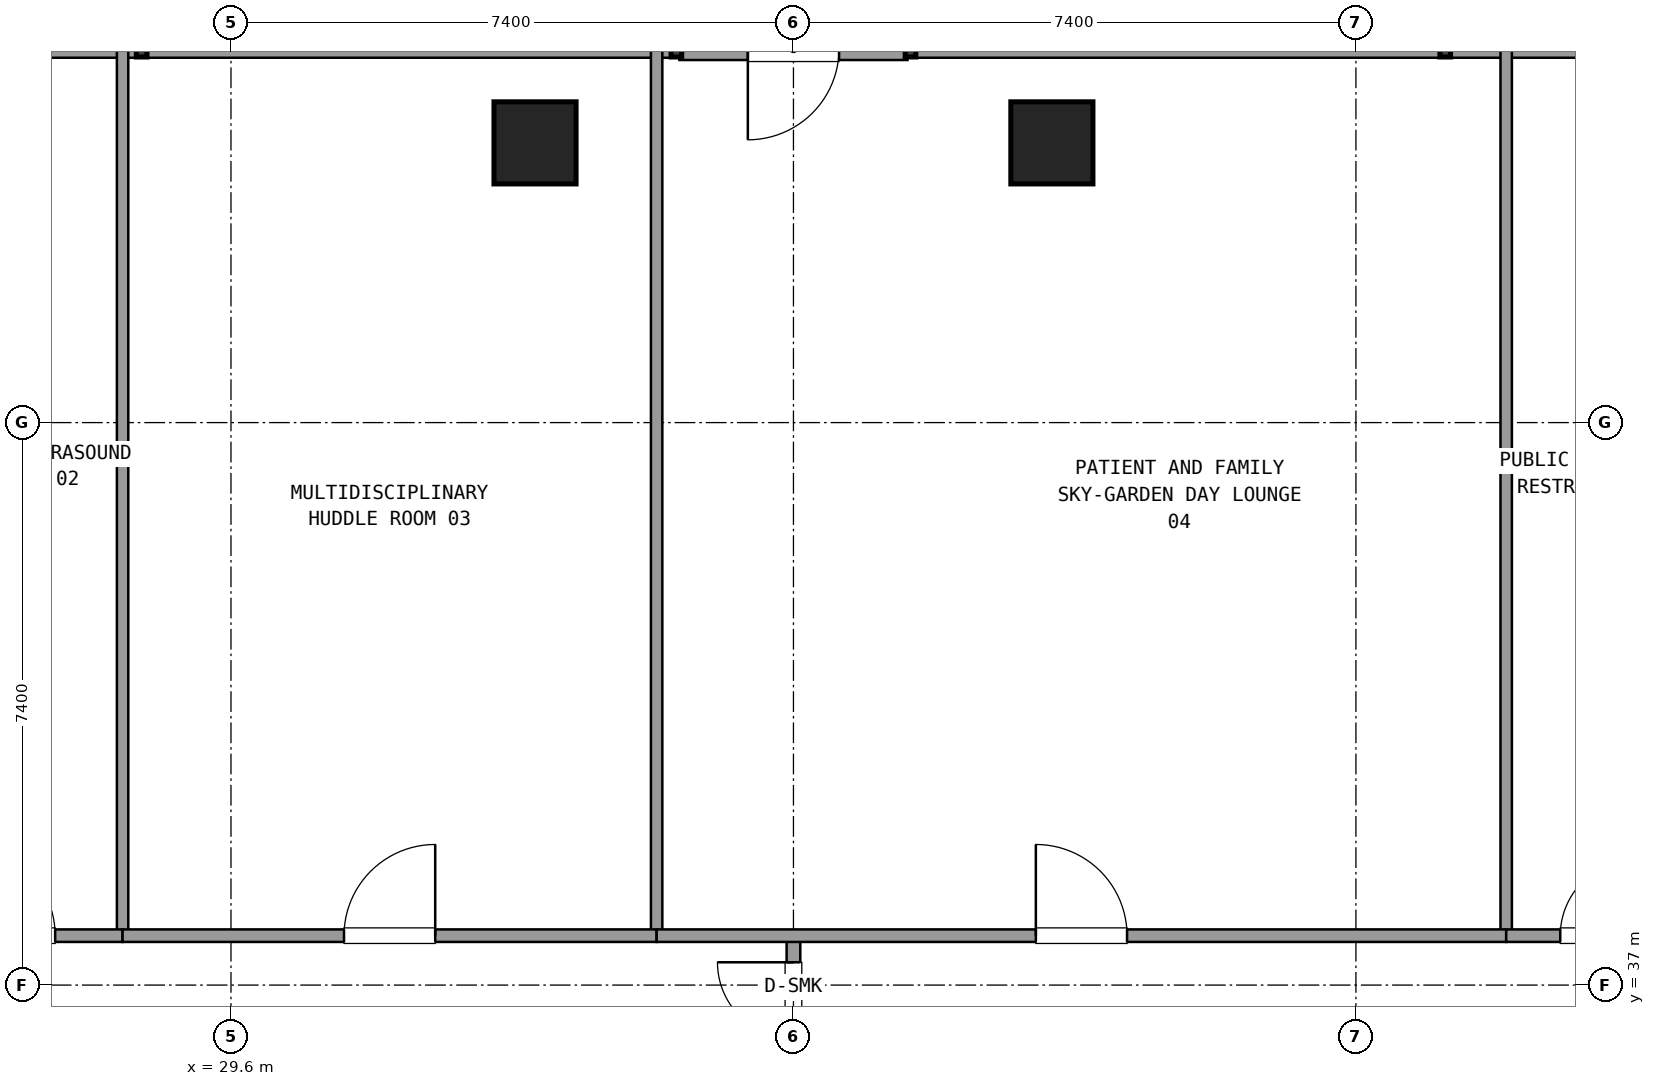
"""IFC4 building model, lengths in metres.
Left out: names, types, materials, properties, quantities, classifications, styles, units other than length and angle.
Written with IfcOpenShell. Run it as: python <this file> out.ifc"""

import sys

from ifc_helpers import new_model, si_unit, direction, frame, frame_2d, origin, origin_2d, place, context, subcontext, project, spatial, rectangle, extrude, element, fill, save


model = new_model("IFC4")
c1 = context("Model", 3, precision=1e-05, world=origin(), true_north=direction((0.0, 1.0)))
c2 = subcontext(c1, "Body", "Model", "MODEL_VIEW")
j1 = project(units=[si_unit("LENGTHUNIT", "METRE"), si_unit("PLANEANGLEUNIT", "RADIAN")], contexts=[c1])
p1 = place(None, origin())
s1 = spatial("IfcSite", under=j1, at=p1, CompositionType="ELEMENT")
p2 = place(p1, origin())
s2 = spatial("IfcBuilding", under=s1, at=p2, CompositionType="ELEMENT")
p3 = place(p2, frame((0.0, 0.0, 38.34)))
s3 = spatial("IfcBuildingStorey", under=s2, at=p3, CompositionType="ELEMENT", Elevation=38.34)
for number, where, z_axis, x_axis in (
    (1, (40.4, 48.08, 0.0), (0.0, 0.0, 1.0), (1.0, 0.0, 0.0)),
    (2, (33.6, 48.08, 0.0), (0.0, 0.0, 1.0), (1.0, 0.0, 0.0)),
):
    element("IfcColumn", number, at=place(p3, frame(where, z_axis=z_axis, x_axis=x_axis)), inside=s3, PredefinedType="COLUMN", context=c2, shape_type="SweptSolid", body=[
        extrude(rectangle(XDim=1.08, YDim=1.08, at=origin_2d()), origin(), (0.0, 0.0, 1.0), 3.6),
    ])
p4 = place(p3, frame((38.5, 49.32, 0.0), z_axis=(0.0, 0.0, 1.0), x_axis=(-1.0, 0.0, 0.0)))
e3 = element("IfcWall", 3, at=p4, inside=s3, PredefinedType="SOLIDWALL", context=c2, shape_type="SweptSolid", body=[
    extrude(rectangle(XDim=3.0, YDim=0.3, at=frame_2d((1.5, 0.0))), origin(), (0.0, 0.0, 1.0), 2.65),
])
p5 = place(p4, frame((0.9, 0.0, 0.0)))
e4 = element("IfcOpeningElement", 4, at=p5, cuts=e3, PredefinedType="OPENING", context=c2, shape_type="SweptSolid", body=[
    extrude(rectangle(XDim=1.2, YDim=2.2, at=frame_2d((0.6, 1.1))), frame((0.0, 0.16, 0.0), z_axis=(0.0, -1.0, 0.0), x_axis=(1.0, 0.0, 0.0)), (0.0, 0.0, 1.0), 0.32),
])
for number, where, z_axis, x_axis in (
    (5, (59.645, 49.32, 0.0), (0.0, 0.0, 1.0), (-1.0, 0.0, 0.0)),
    (6, (35.46, 49.32, 0.0), (0.0, 0.0, 1.0), (-1.0, 0.0, 0.0)),
):
    element("IfcWall", number, at=place(p3, frame(where, z_axis=z_axis, x_axis=x_axis)), inside=s3, PredefinedType="SOLIDWALL", context=c2, shape_type="SweptSolid", body=[
        extrude(rectangle(XDim=21.105, YDim=0.24, at=frame_2d((10.552, 0.0))), origin(), (0.0, 0.0, 1.0), 0.85),
    ])
p6 = place(p3, frame((37.0, 34.95, 0.0), z_axis=(0.0, 0.0, 1.0), x_axis=(0.0, 1.0, 0.0)))
e7 = element("IfcWall", 7, at=p6, inside=s3, PredefinedType="PARTITIONING", context=c2, shape_type="SweptSolid", body=[
    extrude(rectangle(XDim=2.7, YDim=0.18, at=frame_2d((1.35, 0.0))), origin(), (0.0, 0.0, 1.0), 2.61),
])
p7 = place(p6, frame((0.35, 0.0, 0.0)))
e8 = element("IfcOpeningElement", 8, at=p7, cuts=e7, PredefinedType="OPENING", context=c2, shape_type="SweptSolid", body=[
    extrude(rectangle(XDim=2.0, YDim=2.2, at=frame_2d((1.0, 1.1))), frame((0.0, 0.1, 0.0), z_axis=(0.0, -1.0, 0.0), x_axis=(1.0, 0.0, 0.0)), (0.0, 0.0, 1.0), 0.2),
])
p8 = place(p3, frame((28.174, 37.65, 0.0), z_axis=(0.0, 0.0, 1.0), x_axis=(0.0, 1.0, 0.0)))
e9 = element("IfcWall", 9, at=p8, inside=s3, PredefinedType="PARTITIONING", context=c2, shape_type="SweptSolid", body=[
    extrude(rectangle(XDim=11.65, YDim=0.15, at=frame_2d((5.825, 0.0))), origin(), (0.0, 0.0, 1.0), 2.61),
])
p9 = place(p3, frame((25.2, 37.65, 0.0), z_axis=(0.0, 0.0, 1.0), x_axis=(1.0, 0.0, 0.0)))
e10 = element("IfcWall", 10, at=p9, inside=s3, PredefinedType="PARTITIONING", context=c2, shape_type="SweptSolid", body=[
    extrude(rectangle(XDim=2.974, YDim=0.165, at=frame_2d((1.487, 0.0))), origin(), (0.0, 0.0, 1.0), 2.61),
])
p10 = place(p9, frame((0.887, 0.0, 0.0)))
e11 = element("IfcOpeningElement", 11, at=p10, cuts=e10, PredefinedType="OPENING", context=c2, shape_type="SweptSolid", body=[
    extrude(rectangle(XDim=1.2, YDim=2.15, at=frame_2d((0.6, 1.075))), frame((0.0, 0.093, 0.0), z_axis=(0.0, -1.0, 0.0), x_axis=(1.0, 0.0, 0.0)), (0.0, 0.0, 1.0), 0.185),
])
p11 = place(p3, frame((35.2, 37.65, 0.0), z_axis=(0.0, 0.0, 1.0), x_axis=(0.0, 1.0, 0.0)))
e12 = element("IfcWall", 12, at=p11, inside=s3, PredefinedType="PARTITIONING", context=c2, shape_type="SweptSolid", body=[
    extrude(rectangle(XDim=11.65, YDim=0.15, at=frame_2d((5.825, 0.0))), origin(), (0.0, 0.0, 1.0), 2.61),
])
p12 = place(p3, frame((28.174, 37.65, 0.0), z_axis=(0.0, 0.0, 1.0), x_axis=(1.0, 0.0, 0.0)))
e13 = element("IfcWall", 13, at=p12, inside=s3, PredefinedType="PARTITIONING", context=c2, shape_type="SweptSolid", body=[
    extrude(rectangle(XDim=7.026, YDim=0.165, at=frame_2d((3.513, 0.0))), origin(), (0.0, 0.0, 1.0), 2.61),
])
p13 = place(p12, frame((2.913, 0.0, 0.0)))
e14 = element("IfcOpeningElement", 14, at=p13, cuts=e13, PredefinedType="OPENING", context=c2, shape_type="SweptSolid", body=[
    extrude(rectangle(XDim=1.2, YDim=2.15, at=frame_2d((0.6, 1.075))), frame((0.0, 0.093, 0.0), z_axis=(0.0, -1.0, 0.0), x_axis=(1.0, 0.0, 0.0)), (0.0, 0.0, 1.0), 0.185),
])
p14 = place(p3, frame((46.377, 37.65, 0.0), z_axis=(0.0, 0.0, 1.0), x_axis=(0.0, 1.0, 0.0)))
e15 = element("IfcWall", 15, at=p14, inside=s3, PredefinedType="PARTITIONING", context=c2, shape_type="SweptSolid", body=[
    extrude(rectangle(XDim=11.65, YDim=0.15, at=frame_2d((5.825, 0.0))), origin(), (0.0, 0.0, 1.0), 2.61),
])
p15 = place(p3, frame((35.2, 37.65, 0.0), z_axis=(0.0, 0.0, 1.0), x_axis=(1.0, 0.0, 0.0)))
e16 = element("IfcWall", 16, at=p15, inside=s3, PredefinedType="PARTITIONING", context=c2, shape_type="SweptSolid", body=[
    extrude(rectangle(XDim=11.177, YDim=0.165, at=frame_2d((5.588, 0.0))), origin(), (0.0, 0.0, 1.0), 2.61),
])
p16 = place(p15, frame((4.989, 0.0, 0.0)))
e17 = element("IfcOpeningElement", 17, at=p16, cuts=e16, PredefinedType="OPENING", context=c2, shape_type="SweptSolid", body=[
    extrude(rectangle(XDim=1.2, YDim=2.15, at=frame_2d((0.6, 1.075))), frame((0.0, 0.093, 0.0), z_axis=(0.0, -1.0, 0.0), x_axis=(1.0, 0.0, 0.0)), (0.0, 0.0, 1.0), 0.185),
])
p17 = place(p3, frame((46.377, 37.65, 0.0), z_axis=(0.0, 0.0, 1.0), x_axis=(1.0, 0.0, 0.0)))
e18 = element("IfcWall", 18, at=p17, inside=s3, PredefinedType="PARTITIONING", context=c2, shape_type="SweptSolid", body=[
    extrude(rectangle(XDim=2.423, YDim=0.165, at=frame_2d((1.211, 0.0))), origin(), (0.0, 0.0, 1.0), 2.61),
])
p18 = place(p17, frame((0.711, 0.0, 0.0)))
e19 = element("IfcOpeningElement", 19, at=p18, cuts=e18, PredefinedType="OPENING", context=c2, shape_type="SweptSolid", body=[
    extrude(rectangle(XDim=1.0, YDim=2.15, at=frame_2d((0.5, 1.075))), frame((0.0, 0.093, 0.0), z_axis=(0.0, -1.0, 0.0), x_axis=(1.0, 0.0, 0.0)), (0.0, 0.0, 1.0), 0.185),
])
p19 = place(p7, origin())
e20 = element("IfcDoor", 20, at=p19, inside=s3, OperationType="DOUBLE_DOOR_SINGLE_SWING", PredefinedType="DOOR", context=c2, shape_type="SweptSolid", body=[
    extrude(rectangle(XDim=2.0, YDim=2.2, at=frame_2d((1.0, 1.1))), frame((0.0, 0.025, 0.0), z_axis=(0.0, -1.0, 0.0), x_axis=(1.0, 0.0, 0.0)), (0.0, 0.0, 1.0), 0.05),
])
fill(e8, e20)
p20 = place(p10, origin())
e21 = element("IfcDoor", 21, at=p20, inside=s3, OperationType="SINGLE_SWING_LEFT", PredefinedType="DOOR", context=c2, shape_type="SweptSolid", body=[
    extrude(rectangle(XDim=1.2, YDim=2.15, at=frame_2d((0.6, 1.075))), frame((0.0, 0.025, 0.0), z_axis=(0.0, -1.0, 0.0), x_axis=(1.0, 0.0, 0.0)), (0.0, 0.0, 1.0), 0.05),
])
fill(e11, e21)
p21 = place(p13, origin())
e22 = element("IfcDoor", 22, at=p21, inside=s3, OperationType="SINGLE_SWING_RIGHT", PredefinedType="DOOR", context=c2, shape_type="SweptSolid", body=[
    extrude(rectangle(XDim=1.2, YDim=2.15, at=frame_2d((0.6, 1.075))), frame((0.0, 0.025, 0.0), z_axis=(0.0, -1.0, 0.0), x_axis=(1.0, 0.0, 0.0)), (0.0, 0.0, 1.0), 0.05),
])
fill(e14, e22)
p22 = place(p16, origin())
e23 = element("IfcDoor", 23, at=p22, inside=s3, OperationType="SINGLE_SWING_LEFT", PredefinedType="DOOR", context=c2, shape_type="SweptSolid", body=[
    extrude(rectangle(XDim=1.2, YDim=2.15, at=frame_2d((0.6, 1.075))), frame((0.0, 0.025, 0.0), z_axis=(0.0, -1.0, 0.0), x_axis=(1.0, 0.0, 0.0)), (0.0, 0.0, 1.0), 0.05),
])
fill(e17, e23)
p23 = place(p18, origin())
e24 = element("IfcDoor", 24, at=p23, inside=s3, OperationType="SINGLE_SWING_RIGHT", PredefinedType="DOOR", context=c2, shape_type="SweptSolid", body=[
    extrude(rectangle(XDim=1.0, YDim=2.15, at=frame_2d((0.5, 1.075))), frame((0.0, 0.025, 0.0), z_axis=(0.0, -1.0, 0.0), x_axis=(1.0, 0.0, 0.0)), (0.0, 0.0, 1.0), 0.05),
])
fill(e19, e24)
save(model, sys.argv[1])
